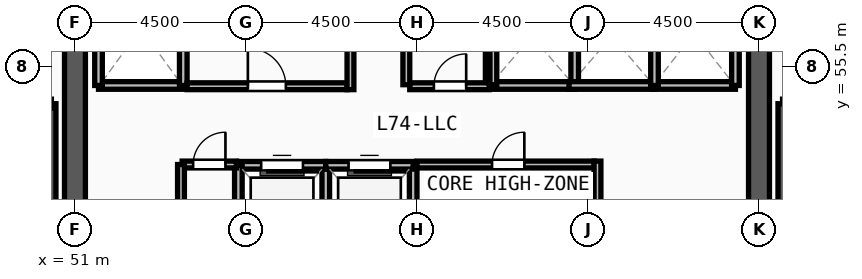
"""IFC4 building model, lengths in metres.
Left out: names, types, materials, properties, quantities, classifications, styles, units other than length and angle.
Written with IfcOpenShell. Run it as: python <this file> out.ifc"""

import sys

from ifc_helpers import new_model, si_unit, direction, frame, frame_2d, origin, place, context, subcontext, project, spatial, rectangle, extrude, source, transform, mapped, element, fill, save


model = new_model("IFC4")
c1 = context("Model", 3, precision=1e-05, world=origin(), true_north=direction((0.0, 1.0)))
c2 = subcontext(c1, "Body", "Model", "MODEL_VIEW")
j1 = project(units=[si_unit("LENGTHUNIT", "METRE"), si_unit("PLANEANGLEUNIT", "RADIAN")], contexts=[c1])
p1 = place(None, origin())
s1 = spatial("IfcSite", under=j1, at=p1, CompositionType="ELEMENT")
p2 = place(p1, origin())
s2 = spatial("IfcBuilding", under=s1, at=p2, CompositionType="ELEMENT")
p3 = place(p2, frame((0.0, 0.0, 286.5)))
s3 = spatial("IfcBuildingStorey", under=s2, at=p3, CompositionType="ELEMENT", Elevation=286.5)
p4 = place(p3, frame((69.0, 60.9, 0.0), z_axis=(0.0, 0.0, 1.0), x_axis=(0.0, -1.0, 0.0)))
e1 = element("IfcWall", 1, at=p4, inside=s3, PredefinedType="SHEAR", context=c2, shape_type="SweptSolid", body=[
    extrude(rectangle(XDim=13.8, YDim=0.55, at=frame_2d((6.9, 0.0))), origin(), (0.0, 0.0, 1.0), 3.57),
])
m1 = source(origin(), c2, "Body", "SweptSolid", [
    extrude(rectangle(XDim=1.2, YDim=2.2, at=frame_2d((0.6, 1.1))), frame((0.0, 0.285, 0.0), z_axis=(0.0, -1.0, 0.0), x_axis=(1.0, 0.0, 0.0)), (0.0, 0.0, 1.0), 0.57),
])
p5 = place(p4, frame((1.35, 0.0, 0.0)))
e2 = element("IfcOpeningElement", 2, at=p5, cuts=e1, PredefinedType="OPENING", context=c2, shape_type="MappedRepresentation", body=[
    mapped(m1, transform((0.0, 0.0, 0.0), x_axis=(1.0, 0.0, 0.0), y_axis=(0.0, 1.0, 0.0), z_axis=(0.0, 0.0, 1.0), scale=1.0)),
])
p6 = place(p3, frame((51.0, 47.1, 0.0), z_axis=(0.0, 0.0, 1.0), x_axis=(0.0, 1.0, 0.0)))
e3 = element("IfcWall", 3, at=p6, inside=s3, PredefinedType="SHEAR", context=c2, shape_type="SweptSolid", body=[
    extrude(rectangle(XDim=13.8, YDim=0.55, at=frame_2d((6.9, 0.0))), origin(), (0.0, 0.0, 1.0), 3.57),
])
for number, where, z_axis, x_axis in (
    (4, (50.38, 46.7, 0.0), (0.0, 0.0, 1.0), (0.0, 1.0, 0.0)),
    (5, (69.62, 54.52, 0.0), (0.0, 0.0, 1.0), (0.0, -1.0, 0.0)),
):
    element("IfcWall", number, at=place(p3, frame(where, z_axis=z_axis, x_axis=x_axis)), inside=s3, PredefinedType="SOLIDWALL", context=c2, shape_type="SweptSolid", body=[
        extrude(rectangle(XDim=7.82, YDim=0.24, at=frame_2d((3.91, 0.0))), origin(), (0.0, 0.0, 1.0), 3.57),
    ])
p7 = place(p3, frame((51.62, 55.0, 0.0), z_axis=(0.0, 0.0, 1.0), x_axis=(1.0, 0.0, 0.0)))
e6 = element("IfcWall", 6, at=p7, inside=s3, PredefinedType="SOLIDWALL", context=c2, shape_type="SweptSolid", body=[
    extrude(rectangle(XDim=2.23, YDim=0.2, at=frame_2d((1.115, 0.0))), origin(), (0.0, 0.0, 1.0), 3.57),
])
for number, where, z_axis, x_axis in (
    (7, (53.85, 55.0, 0.0), (0.0, 0.0, 1.0), (0.0, 1.0, 0.0)),
    (8, (51.62, 58.0, 0.0), (0.0, 0.0, 1.0), (0.0, -1.0, 0.0)),
):
    element("IfcWall", number, at=place(p3, frame(where, z_axis=z_axis, x_axis=x_axis)), inside=s3, PredefinedType="SOLIDWALL", context=c2, shape_type="SweptSolid", body=[
        extrude(rectangle(XDim=3.0, YDim=0.2, at=frame_2d((1.5, 0.0))), origin(), (0.0, 0.0, 1.0), 3.57),
    ])
p8 = place(p3, frame((66.2, 55.0, 0.0), z_axis=(0.0, 0.0, 1.0), x_axis=(1.0, 0.0, 0.0)))
e9 = element("IfcWall", 9, at=p8, inside=s3, PredefinedType="SOLIDWALL", context=c2, shape_type="SweptSolid", body=[
    extrude(rectangle(XDim=2.18, YDim=0.2, at=frame_2d((1.09, 0.0))), origin(), (0.0, 0.0, 1.0), 3.57),
])
p9 = place(p3, frame((68.38, 55.0, 0.0), z_axis=(0.0, 0.0, 1.0), x_axis=(0.0, 1.0, 0.0)))
e10 = element("IfcWall", 10, at=p9, inside=s3, PredefinedType="SOLIDWALL", context=c2, shape_type="SweptSolid", body=[
    extrude(rectangle(XDim=2.75, YDim=0.2, at=frame_2d((1.375, 0.0))), origin(), (0.0, 0.0, 1.0), 3.57),
])
p10 = place(p3, frame((61.9, 55.0, 0.0), z_axis=(0.0, 0.0, 1.0), x_axis=(1.0, 0.0, 0.0)))
e11 = element("IfcWall", 11, at=p10, inside=s3, PredefinedType="SOLIDWALL", context=c2, shape_type="SweptSolid", body=[
    extrude(rectangle(XDim=2.25, YDim=0.2, at=frame_2d((1.125, 0.0))), origin(), (0.0, 0.0, 1.0), 3.57),
])
for number, where, z_axis, x_axis in (
    (12, (64.15, 55.0, 0.0), (0.0, 0.0, 1.0), (0.0, 1.0, 0.0)),
    (13, (61.9, 57.6, 0.0), (0.0, 0.0, 1.0), (0.0, -1.0, 0.0)),
):
    element("IfcWall", number, at=place(p3, frame(where, z_axis=z_axis, x_axis=x_axis)), inside=s3, PredefinedType="SOLIDWALL", context=c2, shape_type="SweptSolid", body=[
        extrude(rectangle(XDim=2.6, YDim=0.2, at=frame_2d((1.3, 0.0))), origin(), (0.0, 0.0, 1.0), 3.57),
    ])
p11 = place(p3, frame((64.0, 55.0, 0.0), z_axis=(0.0, 0.0, 1.0), x_axis=(1.0, 0.0, 0.0)))
e14 = element("IfcWall", 14, at=p11, inside=s3, PredefinedType="SOLIDWALL", context=c2, shape_type="SweptSolid", body=[
    extrude(rectangle(XDim=2.25, YDim=0.2, at=frame_2d((1.125, 0.0))), origin(), (0.0, 0.0, 1.0), 3.57),
])
p12 = place(p3, frame((66.25, 55.0, 0.0), z_axis=(0.0, 0.0, 1.0), x_axis=(0.0, 1.0, 0.0)))
e15 = element("IfcWall", 15, at=p12, inside=s3, PredefinedType="SOLIDWALL", context=c2, shape_type="SweptSolid", body=[
    extrude(rectangle(XDim=2.6, YDim=0.2, at=frame_2d((1.3, 0.0))), origin(), (0.0, 0.0, 1.0), 3.57),
])
p13 = place(p3, frame((57.6, 50.3, 0.0), z_axis=(0.0, 0.0, 1.0), x_axis=(0.0, 1.0, 0.0)))
e16 = element("IfcWall", 16, at=p13, inside=s3, PredefinedType="SOLIDWALL", context=c2, shape_type="SweptSolid", body=[
    extrude(rectangle(XDim=2.6, YDim=0.2, at=frame_2d((1.3, 0.0))), origin(), (0.0, 0.0, 1.0), 3.57),
])
p14 = place(p3, frame((57.6, 52.9, 0.0), z_axis=(0.0, 0.0, 1.0), x_axis=(-1.0, 0.0, 0.0)))
e17 = element("IfcWall", 17, at=p14, inside=s3, PredefinedType="SOLIDWALL", context=c2, shape_type="SweptSolid", body=[
    extrude(rectangle(XDim=2.3, YDim=0.2, at=frame_2d((1.15, 0.0))), origin(), (0.0, 0.0, 1.0), 3.57),
])
m2 = source(origin(), c2, "Body", "SweptSolid", [
    extrude(rectangle(XDim=1.1, YDim=2.2, at=frame_2d((0.55, 1.1))), frame((0.0, 0.11, 0.0), z_axis=(0.0, -1.0, 0.0), x_axis=(1.0, 0.0, 0.0)), (0.0, 0.0, 1.0), 0.22),
])
p15 = place(p14, frame((0.6, 0.0, 0.0)))
e18 = element("IfcOpeningElement", 18, at=p15, cuts=e17, PredefinedType="OPENING", context=c2, shape_type="MappedRepresentation", body=[
    mapped(m2, transform((0.0, 0.0, 0.0), x_axis=(1.0, 0.0, 0.0), y_axis=(0.0, 1.0, 0.0), z_axis=(0.0, 0.0, 1.0), scale=1.0)),
])
for number, where, z_axis, x_axis in (
    (19, (55.3, 52.9, 0.0), (0.0, 0.0, 1.0), (0.0, -1.0, 0.0)),
    (20, (59.9, 50.3, 0.0), (0.0, 0.0, 1.0), (0.0, 1.0, 0.0)),
):
    element("IfcWall", number, at=place(p3, frame(where, z_axis=z_axis, x_axis=x_axis)), inside=s3, PredefinedType="SOLIDWALL", context=c2, shape_type="SweptSolid", body=[
        extrude(rectangle(XDim=2.6, YDim=0.2, at=frame_2d((1.3, 0.0))), origin(), (0.0, 0.0, 1.0), 3.57),
    ])
p16 = place(p3, frame((59.9, 52.9, 0.0), z_axis=(0.0, 0.0, 1.0), x_axis=(-1.0, 0.0, 0.0)))
e21 = element("IfcWall", 21, at=p16, inside=s3, PredefinedType="SOLIDWALL", context=c2, shape_type="SweptSolid", body=[
    extrude(rectangle(XDim=2.3, YDim=0.2, at=frame_2d((1.15, 0.0))), origin(), (0.0, 0.0, 1.0), 3.57),
])
p17 = place(p16, frame((0.6, 0.0, 0.0)))
e22 = element("IfcOpeningElement", 22, at=p17, cuts=e21, PredefinedType="OPENING", context=c2, shape_type="MappedRepresentation", body=[
    mapped(m2, transform((0.0, 0.0, 0.0), x_axis=(1.0, 0.0, 0.0), y_axis=(0.0, 1.0, 0.0), z_axis=(0.0, 0.0, 1.0), scale=1.0)),
])
p18 = place(p3, frame((60.0, 52.92, 0.0), z_axis=(0.0, 0.0, 1.0), x_axis=(1.0, 0.0, 0.0)))
e23 = element("IfcWall", 23, at=p18, inside=s3, PredefinedType="PARTITIONING", context=c2, shape_type="SweptSolid", body=[
    extrude(rectangle(XDim=4.66, YDim=0.18, at=frame_2d((2.33, 0.0))), origin(), (0.0, 0.0, 1.0), 3.57),
])
m3 = source(origin(), c2, "Body", "SweptSolid", [
    extrude(rectangle(XDim=0.85, YDim=2.1, at=frame_2d((0.425, 1.05))), frame((0.0, 0.1, 0.0), z_axis=(0.0, -1.0, 0.0), x_axis=(1.0, 0.0, 0.0)), (0.0, 0.0, 1.0), 0.2),
])
p19 = place(p18, frame((1.975, 0.0, 0.0)))
e24 = element("IfcOpeningElement", 24, at=p19, cuts=e23, PredefinedType="OPENING", context=c2, shape_type="MappedRepresentation", body=[
    mapped(m3, transform((0.0, 0.0, 0.0), x_axis=(1.0, 0.0, 0.0), y_axis=(0.0, 1.0, 0.0), z_axis=(0.0, 0.0, 1.0), scale=1.0)),
])
p20 = place(p3, frame((53.95, 54.98, 0.0), z_axis=(0.0, 0.0, 1.0), x_axis=(1.0, 0.0, 0.0)))
e25 = element("IfcWall", 25, at=p20, inside=s3, PredefinedType="PARTITIONING", context=c2, shape_type="SweptSolid", body=[
    extrude(rectangle(XDim=4.21, YDim=0.18, at=frame_2d((2.105, 0.0))), origin(), (0.0, 0.0, 1.0), 3.57),
])
m4 = source(origin(), c2, "Body", "SweptSolid", [
    extrude(rectangle(XDim=1.0, YDim=2.2, at=frame_2d((0.5, 1.1))), frame((0.0, 0.1, 0.0), z_axis=(0.0, -1.0, 0.0), x_axis=(1.0, 0.0, 0.0)), (0.0, 0.0, 1.0), 0.2),
])
p21 = place(p20, frame((1.6, 0.0, 0.0)))
e26 = element("IfcOpeningElement", 26, at=p21, cuts=e25, PredefinedType="OPENING", context=c2, shape_type="MappedRepresentation", body=[
    mapped(m4, transform((0.0, 0.0, 0.0), x_axis=(1.0, 0.0, 0.0), y_axis=(0.0, 1.0, 0.0), z_axis=(0.0, 0.0, 1.0), scale=1.0)),
])
p22 = place(p3, frame((59.81, 54.98, 0.0), z_axis=(0.0, 0.0, 1.0), x_axis=(1.0, 0.0, 0.0)))
e27 = element("IfcWall", 27, at=p22, inside=s3, PredefinedType="PARTITIONING", context=c2, shape_type="SweptSolid", body=[
    extrude(rectangle(XDim=2.09, YDim=0.18, at=frame_2d((1.045, 0.0))), origin(), (0.0, 0.0, 1.0), 3.57),
])
p23 = place(p22, frame((0.635, 0.0, 0.0)))
e28 = element("IfcOpeningElement", 28, at=p23, cuts=e27, PredefinedType="OPENING", context=c2, shape_type="MappedRepresentation", body=[
    mapped(m3, transform((0.0, 0.0, 0.0), x_axis=(1.0, 0.0, 0.0), y_axis=(0.0, 1.0, 0.0), z_axis=(0.0, 0.0, 1.0), scale=1.0)),
])
p24 = place(p3, frame((53.82, 52.92, 0.0), z_axis=(0.0, 0.0, 1.0), x_axis=(1.0, 0.0, 0.0)))
e29 = element("IfcWall", 29, at=p24, inside=s3, PredefinedType="PARTITIONING", context=c2, shape_type="SweptSolid", body=[
    extrude(rectangle(XDim=1.43, YDim=0.18, at=frame_2d((0.715, 0.0))), origin(), (0.0, 0.0, 1.0), 3.57),
])
p25 = place(p24, frame((0.29, 0.0, 0.0)))
e30 = element("IfcOpeningElement", 30, at=p25, cuts=e29, PredefinedType="OPENING", context=c2, shape_type="MappedRepresentation", body=[
    mapped(m3, transform((0.0, 0.0, 0.0), x_axis=(1.0, 0.0, 0.0), y_axis=(0.0, 1.0, 0.0), z_axis=(0.0, 0.0, 1.0), scale=1.0)),
])
for number, where, z_axis, x_axis in (
    (31, (59.72, 55.02, 0.0), (0.0, 0.0, 1.0), (0.0, 1.0, 0.0)),
    (32, (62.01, 55.02, 0.0), (0.0, 0.0, 1.0), (0.0, 1.0, 0.0)),
):
    element("IfcWall", number, at=place(p3, frame(where, z_axis=z_axis, x_axis=x_axis)), inside=s3, PredefinedType="PARTITIONING", context=c2, shape_type="SweptSolid", body=[
        extrude(rectangle(XDim=2.88, YDim=0.18, at=frame_2d((1.44, 0.0))), origin(), (0.0, 0.0, 1.0), 3.57),
    ])
p26 = place(p3, frame((53.79, 50.35, 0.0), z_axis=(0.0, 0.0, 1.0), x_axis=(0.0, 1.0, 0.0)))
e33 = element("IfcWall", 33, at=p26, inside=s3, PredefinedType="PARTITIONING", context=c2, shape_type="SweptSolid", body=[
    extrude(rectangle(XDim=2.57, YDim=0.18, at=frame_2d((1.285, 0.0))), origin(), (0.0, 0.0, 1.0), 3.57),
])
p27 = place(p3, frame((64.75, 50.36, 0.0), z_axis=(0.0, 0.0, 1.0), x_axis=(0.0, 1.0, 0.0)))
e34 = element("IfcWall", 34, at=p27, inside=s3, PredefinedType="PARTITIONING", context=c2, shape_type="SweptSolid", body=[
    extrude(rectangle(XDim=2.65, YDim=0.18, at=frame_2d((1.325, 0.0))), origin(), (0.0, 0.0, 1.0), 3.57),
])
p28 = place(p3, frame((58.25, 54.89, 0.0), z_axis=(0.0, 0.0, 1.0), x_axis=(0.0, 1.0, 0.0)))
e35 = element("IfcWall", 35, at=p28, inside=s3, PredefinedType="PARTITIONING", context=c2, shape_type="SweptSolid", body=[
    extrude(rectangle(XDim=3.02, YDim=0.18, at=frame_2d((1.51, 0.0))), origin(), (0.0, 0.0, 1.0), 3.57),
])
m5 = source(origin(), c2, "Body", "SweptSolid", [
    extrude(rectangle(XDim=1.1, YDim=2.2, at=frame_2d((0.55, 1.1))), frame((0.0, 0.025, 0.0), z_axis=(0.0, -1.0, 0.0), x_axis=(1.0, 0.0, 0.0)), (0.0, 0.0, 1.0), 0.05),
])
p29 = place(p15, origin())
e36 = element("IfcDoor", 36, at=p29, inside=s3, OperationType="SLIDING_TO_LEFT", PredefinedType="DOOR", context=c2, shape_type="MappedRepresentation", body=[
    mapped(m5, transform((0.0, 0.0, 0.0), x_axis=(1.0, 0.0, 0.0), y_axis=(0.0, 1.0, 0.0), z_axis=(0.0, 0.0, 1.0), scale=1.0)),
])
fill(e18, e36)
p30 = place(p17, origin())
e37 = element("IfcDoor", 37, at=p30, inside=s3, OperationType="SLIDING_TO_LEFT", PredefinedType="DOOR", context=c2, shape_type="MappedRepresentation", body=[
    mapped(m5, transform((0.0, 0.0, 0.0), x_axis=(1.0, 0.0, 0.0), y_axis=(0.0, 1.0, 0.0), z_axis=(0.0, 0.0, 1.0), scale=1.0)),
])
fill(e22, e37)
m6 = source(origin(), c2, "Body", "SweptSolid", [
    extrude(rectangle(XDim=0.85, YDim=2.1, at=frame_2d((0.425, 1.05))), frame((0.0, 0.025, 0.0), z_axis=(0.0, -1.0, 0.0), x_axis=(1.0, 0.0, 0.0)), (0.0, 0.0, 1.0), 0.05),
])
p31 = place(p19, origin())
e38 = element("IfcDoor", 38, at=p31, inside=s3, OperationType="SINGLE_SWING_RIGHT", PredefinedType="DOOR", context=c2, shape_type="MappedRepresentation", body=[
    mapped(m6, transform((0.0, 0.0, 0.0), x_axis=(1.0, 0.0, 0.0), y_axis=(0.0, 1.0, 0.0), z_axis=(0.0, 0.0, 1.0), scale=1.0)),
])
fill(e24, e38)
m7 = source(origin(), c2, "Body", "SweptSolid", [
    extrude(rectangle(XDim=1.0, YDim=2.2, at=frame_2d((0.5, 1.1))), frame((0.0, 0.025, 0.0), z_axis=(0.0, -1.0, 0.0), x_axis=(1.0, 0.0, 0.0)), (0.0, 0.0, 1.0), 0.05),
])
p32 = place(p21, origin())
e39 = element("IfcDoor", 39, at=p32, inside=s3, OperationType="SINGLE_SWING_LEFT", PredefinedType="DOOR", context=c2, shape_type="MappedRepresentation", body=[
    mapped(m7, transform((0.0, 0.0, 0.0), x_axis=(1.0, 0.0, 0.0), y_axis=(0.0, 1.0, 0.0), z_axis=(0.0, 0.0, 1.0), scale=1.0)),
])
fill(e26, e39)
p33 = place(p23, origin())
e40 = element("IfcDoor", 40, at=p33, inside=s3, OperationType="SINGLE_SWING_RIGHT", PredefinedType="DOOR", context=c2, shape_type="MappedRepresentation", body=[
    mapped(m6, transform((0.0, 0.0, 0.0), x_axis=(1.0, 0.0, 0.0), y_axis=(0.0, 1.0, 0.0), z_axis=(0.0, 0.0, 1.0), scale=1.0)),
])
fill(e28, e40)
p34 = place(p25, origin())
e41 = element("IfcDoor", 41, at=p34, inside=s3, OperationType="SINGLE_SWING_RIGHT", PredefinedType="DOOR", context=c2, shape_type="MappedRepresentation", body=[
    mapped(m6, transform((0.0, 0.0, 0.0), x_axis=(1.0, 0.0, 0.0), y_axis=(0.0, 1.0, 0.0), z_axis=(0.0, 0.0, 1.0), scale=1.0)),
])
fill(e30, e41)
save(model, sys.argv[1])
